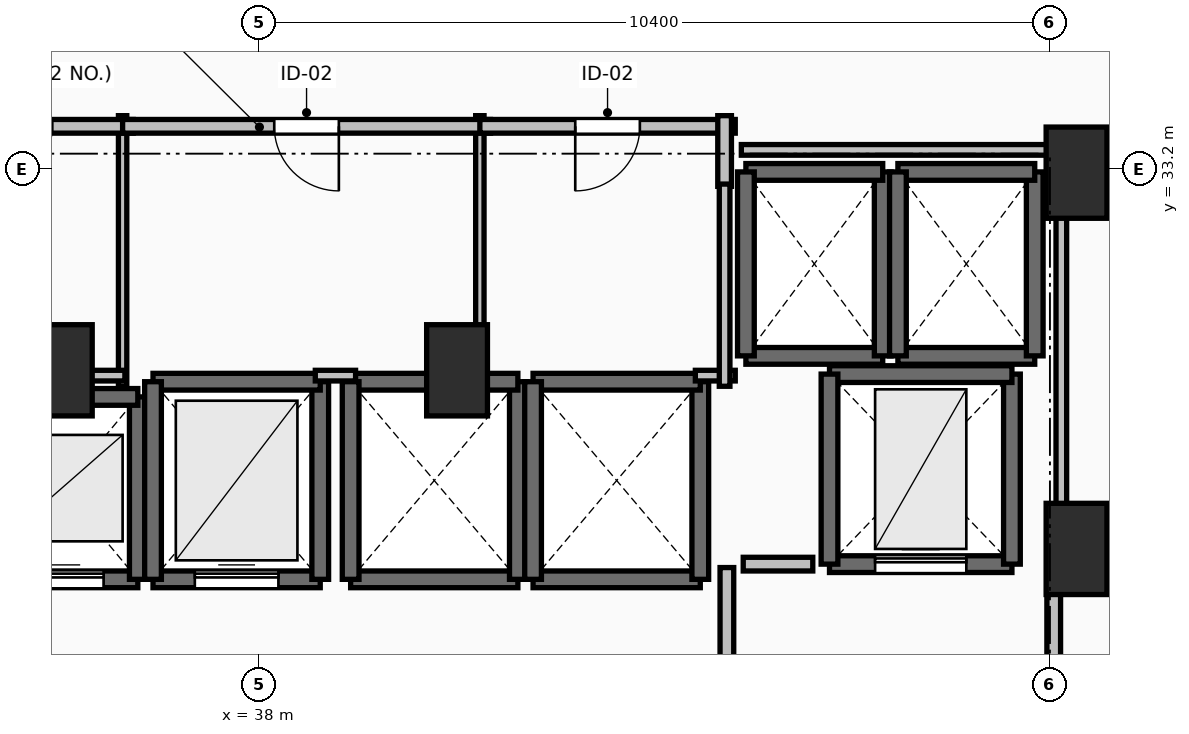
"""IFC4 building model, lengths in metres.
Left out: names, types, materials, properties, quantities, classifications, styles, units other than length and angle.
Written with IfcOpenShell. Run it as: python <this file> out.ifc"""

import sys

from ifc_helpers import new_model, si_unit, direction, frame, frame_2d, origin, origin_2d, place, context, subcontext, project, spatial, rectangle, extrude, element, fill, save


model = new_model("IFC4")
c1 = context("Model", 3, precision=1e-05, world=origin(), true_north=direction((0.0, 1.0)))
c2 = subcontext(c1, "Body", "Model", "MODEL_VIEW")
j1 = project(units=[si_unit("LENGTHUNIT", "METRE"), si_unit("PLANEANGLEUNIT", "RADIAN")], contexts=[c1])
p1 = place(None, origin())
s1 = spatial("IfcSite", under=j1, at=p1, CompositionType="ELEMENT")
p2 = place(p1, origin())
s2 = spatial("IfcBuilding", under=s1, at=p2, CompositionType="ELEMENT")
p3 = place(p2, frame((0.0, 0.0, 59.0)))
s3 = spatial("IfcBuildingStorey", under=s2, at=p3, CompositionType="ELEMENT", Elevation=59.0)
for number, where, z_axis, x_axis in (
    (1, (48.75, 33.15, 0.0), (0.0, 0.0, 1.0), (1.0, 0.0, 0.0)),
    (2, (48.75, 28.2, 0.0), (0.0, 0.0, 1.0), (1.0, 0.0, 0.0)),
    (3, (35.4, 30.55, 0.0), (0.0, 0.0, 1.0), (1.0, 0.0, 0.0)),
    (4, (40.6, 30.55, 0.0), (0.0, 0.0, 1.0), (1.0, 0.0, 0.0)),
):
    element("IfcColumn", number, at=place(p3, frame(where, z_axis=z_axis, x_axis=x_axis)), inside=s3, PredefinedType="PILASTER", context=c2, shape_type="SweptSolid", body=[
        extrude(rectangle(XDim=0.8, YDim=1.2, at=origin_2d()), origin(), (0.0, 0.0, 1.0), 3.5),
    ])
p4 = place(p3, frame((34.4, 27.8, 0.0), z_axis=(0.0, 0.0, 1.0), x_axis=(1.0, 0.0, 0.0)))
e5 = element("IfcWall", 5, at=p4, inside=s3, PredefinedType="SOLIDWALL", context=c2, shape_type="SweptSolid", body=[
    extrude(rectangle(XDim=2.0, YDim=0.22, at=frame_2d((1.0, 0.0))), origin(), (0.0, 0.0, 1.0), 3.24),
])
p5 = place(p4, frame((0.45, 0.0, 0.0)))
e6 = element("IfcOpeningElement", 6, at=p5, cuts=e5, PredefinedType="OPENING", context=c2, shape_type="SweptSolid", body=[
    extrude(rectangle(XDim=1.1, YDim=2.2, at=frame_2d((0.55, 1.1))), frame((0.0, 0.125, 0.0), z_axis=(0.0, -1.0, 0.0), x_axis=(1.0, 0.0, 0.0)), (0.0, 0.0, 1.0), 0.25),
])
p6 = place(p3, frame((36.4, 27.8, 0.0), z_axis=(0.0, 0.0, 1.0), x_axis=(0.0, 1.0, 0.0)))
e7 = element("IfcWall", 7, at=p6, inside=s3, PredefinedType="SOLIDWALL", context=c2, shape_type="SweptSolid", body=[
    extrude(rectangle(XDim=2.4, YDim=0.22, at=frame_2d((1.2, 0.0))), origin(), (0.0, 0.0, 1.0), 3.24),
])
p7 = place(p3, frame((36.4, 30.2, 0.0), z_axis=(0.0, 0.0, 1.0), x_axis=(-1.0, 0.0, 0.0)))
e8 = element("IfcWall", 8, at=p7, inside=s3, PredefinedType="SOLIDWALL", context=c2, shape_type="SweptSolid", body=[
    extrude(rectangle(XDim=2.0, YDim=0.22, at=frame_2d((1.0, 0.0))), origin(), (0.0, 0.0, 1.0), 3.24),
])
p8 = place(p3, frame((36.6, 27.8, 0.0), z_axis=(0.0, 0.0, 1.0), x_axis=(1.0, 0.0, 0.0)))
e9 = element("IfcWall", 9, at=p8, inside=s3, PredefinedType="SOLIDWALL", context=c2, shape_type="SweptSolid", body=[
    extrude(rectangle(XDim=2.2, YDim=0.22, at=frame_2d((1.1, 0.0))), origin(), (0.0, 0.0, 1.0), 3.24),
])
p9 = place(p8, frame((0.55, 0.0, 0.0)))
e10 = element("IfcOpeningElement", 10, at=p9, cuts=e9, PredefinedType="OPENING", context=c2, shape_type="SweptSolid", body=[
    extrude(rectangle(XDim=1.1, YDim=2.2, at=frame_2d((0.55, 1.1))), frame((0.0, 0.125, 0.0), z_axis=(0.0, -1.0, 0.0), x_axis=(1.0, 0.0, 0.0)), (0.0, 0.0, 1.0), 0.25),
])
p10 = place(p3, frame((38.8, 27.8, 0.0), z_axis=(0.0, 0.0, 1.0), x_axis=(0.0, 1.0, 0.0)))
e11 = element("IfcWall", 11, at=p10, inside=s3, PredefinedType="SOLIDWALL", context=c2, shape_type="SweptSolid", body=[
    extrude(rectangle(XDim=2.6, YDim=0.22, at=frame_2d((1.3, 0.0))), origin(), (0.0, 0.0, 1.0), 3.24),
])
p11 = place(p3, frame((38.8, 30.4, 0.0), z_axis=(0.0, 0.0, 1.0), x_axis=(-1.0, 0.0, 0.0)))
e12 = element("IfcWall", 12, at=p11, inside=s3, PredefinedType="SOLIDWALL", context=c2, shape_type="SweptSolid", body=[
    extrude(rectangle(XDim=2.2, YDim=0.22, at=frame_2d((1.1, 0.0))), origin(), (0.0, 0.0, 1.0), 3.24),
])
p12 = place(p3, frame((36.6, 30.4, 0.0), z_axis=(0.0, 0.0, 1.0), x_axis=(0.0, -1.0, 0.0)))
e13 = element("IfcWall", 13, at=p12, inside=s3, PredefinedType="SOLIDWALL", context=c2, shape_type="SweptSolid", body=[
    extrude(rectangle(XDim=2.6, YDim=0.22, at=frame_2d((1.3, 0.0))), origin(), (0.0, 0.0, 1.0), 3.24),
])
p13 = place(p3, frame((39.2, 27.8, 0.0), z_axis=(0.0, 0.0, 1.0), x_axis=(1.0, 0.0, 0.0)))
e14 = element("IfcWall", 14, at=p13, inside=s3, PredefinedType="SOLIDWALL", context=c2, shape_type="SweptSolid", body=[
    extrude(rectangle(XDim=2.2, YDim=0.22, at=frame_2d((1.1, 0.0))), origin(), (0.0, 0.0, 1.0), 3.24),
])
p14 = place(p3, frame((41.4, 27.8, 0.0), z_axis=(0.0, 0.0, 1.0), x_axis=(0.0, 1.0, 0.0)))
e15 = element("IfcWall", 15, at=p14, inside=s3, PredefinedType="SOLIDWALL", context=c2, shape_type="SweptSolid", body=[
    extrude(rectangle(XDim=2.6, YDim=0.22, at=frame_2d((1.3, 0.0))), origin(), (0.0, 0.0, 1.0), 3.24),
])
p15 = place(p3, frame((41.4, 30.4, 0.0), z_axis=(0.0, 0.0, 1.0), x_axis=(-1.0, 0.0, 0.0)))
e16 = element("IfcWall", 16, at=p15, inside=s3, PredefinedType="SOLIDWALL", context=c2, shape_type="SweptSolid", body=[
    extrude(rectangle(XDim=2.2, YDim=0.22, at=frame_2d((1.1, 0.0))), origin(), (0.0, 0.0, 1.0), 3.24),
])
p16 = place(p3, frame((39.2, 30.4, 0.0), z_axis=(0.0, 0.0, 1.0), x_axis=(0.0, -1.0, 0.0)))
e17 = element("IfcWall", 17, at=p16, inside=s3, PredefinedType="SOLIDWALL", context=c2, shape_type="SweptSolid", body=[
    extrude(rectangle(XDim=2.6, YDim=0.22, at=frame_2d((1.3, 0.0))), origin(), (0.0, 0.0, 1.0), 3.24),
])
p17 = place(p3, frame((41.6, 27.8, 0.0), z_axis=(0.0, 0.0, 1.0), x_axis=(1.0, 0.0, 0.0)))
e18 = element("IfcWall", 18, at=p17, inside=s3, PredefinedType="SOLIDWALL", context=c2, shape_type="SweptSolid", body=[
    extrude(rectangle(XDim=2.2, YDim=0.22, at=frame_2d((1.1, 0.0))), origin(), (0.0, 0.0, 1.0), 3.24),
])
p18 = place(p3, frame((43.8, 27.8, 0.0), z_axis=(0.0, 0.0, 1.0), x_axis=(0.0, 1.0, 0.0)))
e19 = element("IfcWall", 19, at=p18, inside=s3, PredefinedType="SOLIDWALL", context=c2, shape_type="SweptSolid", body=[
    extrude(rectangle(XDim=2.6, YDim=0.22, at=frame_2d((1.3, 0.0))), origin(), (0.0, 0.0, 1.0), 3.24),
])
p19 = place(p3, frame((43.8, 30.4, 0.0), z_axis=(0.0, 0.0, 1.0), x_axis=(-1.0, 0.0, 0.0)))
e20 = element("IfcWall", 20, at=p19, inside=s3, PredefinedType="SOLIDWALL", context=c2, shape_type="SweptSolid", body=[
    extrude(rectangle(XDim=2.2, YDim=0.22, at=frame_2d((1.1, 0.0))), origin(), (0.0, 0.0, 1.0), 3.24),
])
p20 = place(p3, frame((41.6, 30.4, 0.0), z_axis=(0.0, 0.0, 1.0), x_axis=(0.0, -1.0, 0.0)))
e21 = element("IfcWall", 21, at=p20, inside=s3, PredefinedType="SOLIDWALL", context=c2, shape_type="SweptSolid", body=[
    extrude(rectangle(XDim=2.6, YDim=0.22, at=frame_2d((1.3, 0.0))), origin(), (0.0, 0.0, 1.0), 3.24),
])
p21 = place(p3, frame((44.4, 30.74, 0.0), z_axis=(0.0, 0.0, 1.0), x_axis=(1.0, 0.0, 0.0)))
e22 = element("IfcWall", 22, at=p21, inside=s3, PredefinedType="SOLIDWALL", context=c2, shape_type="SweptSolid", body=[
    extrude(rectangle(XDim=1.8, YDim=0.22, at=frame_2d((0.9, 0.0))), origin(), (0.0, 0.0, 1.0), 3.24),
])
p22 = place(p3, frame((46.2, 30.74, 0.0), z_axis=(0.0, 0.0, 1.0), x_axis=(0.0, 1.0, 0.0)))
e23 = element("IfcWall", 23, at=p22, inside=s3, PredefinedType="SOLIDWALL", context=c2, shape_type="SweptSolid", body=[
    extrude(rectangle(XDim=2.42, YDim=0.22, at=frame_2d((1.21, 0.0))), origin(), (0.0, 0.0, 1.0), 3.24),
])
p23 = place(p3, frame((46.2, 33.16, 0.0), z_axis=(0.0, 0.0, 1.0), x_axis=(-1.0, 0.0, 0.0)))
e24 = element("IfcWall", 24, at=p23, inside=s3, PredefinedType="SOLIDWALL", context=c2, shape_type="SweptSolid", body=[
    extrude(rectangle(XDim=1.8, YDim=0.22, at=frame_2d((0.9, 0.0))), origin(), (0.0, 0.0, 1.0), 3.24),
])
p24 = place(p3, frame((44.4, 33.16, 0.0), z_axis=(0.0, 0.0, 1.0), x_axis=(0.0, -1.0, 0.0)))
e25 = element("IfcWall", 25, at=p24, inside=s3, PredefinedType="SOLIDWALL", context=c2, shape_type="SweptSolid", body=[
    extrude(rectangle(XDim=2.42, YDim=0.22, at=frame_2d((1.21, 0.0))), origin(), (0.0, 0.0, 1.0), 3.24),
])
p25 = place(p3, frame((46.4, 30.74, 0.0), z_axis=(0.0, 0.0, 1.0), x_axis=(1.0, 0.0, 0.0)))
e26 = element("IfcWall", 26, at=p25, inside=s3, PredefinedType="SOLIDWALL", context=c2, shape_type="SweptSolid", body=[
    extrude(rectangle(XDim=1.8, YDim=0.22, at=frame_2d((0.9, 0.0))), origin(), (0.0, 0.0, 1.0), 3.24),
])
p26 = place(p3, frame((48.2, 30.74, 0.0), z_axis=(0.0, 0.0, 1.0), x_axis=(0.0, 1.0, 0.0)))
e27 = element("IfcWall", 27, at=p26, inside=s3, PredefinedType="SOLIDWALL", context=c2, shape_type="SweptSolid", body=[
    extrude(rectangle(XDim=2.42, YDim=0.22, at=frame_2d((1.21, 0.0))), origin(), (0.0, 0.0, 1.0), 3.24),
])
p27 = place(p3, frame((48.2, 33.16, 0.0), z_axis=(0.0, 0.0, 1.0), x_axis=(-1.0, 0.0, 0.0)))
e28 = element("IfcWall", 28, at=p27, inside=s3, PredefinedType="SOLIDWALL", context=c2, shape_type="SweptSolid", body=[
    extrude(rectangle(XDim=1.8, YDim=0.22, at=frame_2d((0.9, 0.0))), origin(), (0.0, 0.0, 1.0), 3.24),
])
p28 = place(p3, frame((46.4, 33.16, 0.0), z_axis=(0.0, 0.0, 1.0), x_axis=(0.0, -1.0, 0.0)))
e29 = element("IfcWall", 29, at=p28, inside=s3, PredefinedType="SOLIDWALL", context=c2, shape_type="SweptSolid", body=[
    extrude(rectangle(XDim=2.42, YDim=0.22, at=frame_2d((1.21, 0.0))), origin(), (0.0, 0.0, 1.0), 3.24),
])
p29 = place(p3, frame((45.5, 28.0, 0.0), z_axis=(0.0, 0.0, 1.0), x_axis=(1.0, 0.0, 0.0)))
e30 = element("IfcWall", 30, at=p29, inside=s3, PredefinedType="SHEAR", context=c2, shape_type="SweptSolid", body=[
    extrude(rectangle(XDim=2.4, YDim=0.22, at=frame_2d((1.2, 0.0))), origin(), (0.0, 0.0, 1.0), 3.24),
])
p30 = place(p29, frame((0.6, 0.0, 0.0)))
e31 = element("IfcOpeningElement", 31, at=p30, cuts=e30, PredefinedType="OPENING", context=c2, shape_type="SweptSolid", body=[
    extrude(rectangle(XDim=1.2, YDim=2.2, at=frame_2d((0.6, 1.1))), frame((0.0, 0.125, 0.0), z_axis=(0.0, -1.0, 0.0), x_axis=(1.0, 0.0, 0.0)), (0.0, 0.0, 1.0), 0.25),
])
p31 = place(p3, frame((47.9, 28.0, 0.0), z_axis=(0.0, 0.0, 1.0), x_axis=(0.0, 1.0, 0.0)))
e32 = element("IfcWall", 32, at=p31, inside=s3, PredefinedType="SHEAR", context=c2, shape_type="SweptSolid", body=[
    extrude(rectangle(XDim=2.5, YDim=0.22, at=frame_2d((1.25, 0.0))), origin(), (0.0, 0.0, 1.0), 3.24),
])
p32 = place(p3, frame((47.9, 30.5, 0.0), z_axis=(0.0, 0.0, 1.0), x_axis=(-1.0, 0.0, 0.0)))
e33 = element("IfcWall", 33, at=p32, inside=s3, PredefinedType="SHEAR", context=c2, shape_type="SweptSolid", body=[
    extrude(rectangle(XDim=2.4, YDim=0.22, at=frame_2d((1.2, 0.0))), origin(), (0.0, 0.0, 1.0), 3.24),
])
p33 = place(p3, frame((45.5, 30.5, 0.0), z_axis=(0.0, 0.0, 1.0), x_axis=(0.0, -1.0, 0.0)))
e34 = element("IfcWall", 34, at=p33, inside=s3, PredefinedType="SHEAR", context=c2, shape_type="SweptSolid", body=[
    extrude(rectangle(XDim=2.5, YDim=0.22, at=frame_2d((1.25, 0.0))), origin(), (0.0, 0.0, 1.0), 3.24),
])
p34 = place(p3, frame((44.15, 27.955, 0.0), z_axis=(0.0, 0.0, 1.0), x_axis=(0.0, -1.0, 0.0)))
e35 = element("IfcWall", 35, at=p34, inside=s3, PredefinedType="PARTITIONING", context=c2, shape_type="SweptSolid", body=[
    extrude(rectangle(XDim=3.91, YDim=0.18, at=frame_2d((1.955, 0.0))), origin(), (0.0, 0.0, 1.0), 3.24),
])
p35 = place(p34, frame((1.355, 0.0, 0.0)))
e36 = element("IfcOpeningElement", 36, at=p35, cuts=e35, PredefinedType="OPENING", context=c2, shape_type="SweptSolid", body=[
    extrude(rectangle(XDim=1.2, YDim=2.15, at=frame_2d((0.6, 1.075))), frame((0.0, 0.105, 0.0), z_axis=(0.0, -1.0, 0.0), x_axis=(1.0, 0.0, 0.0)), (0.0, 0.0, 1.0), 0.21),
])
p36 = place(p3, frame((48.45, 23.95, 0.0), z_axis=(0.0, 0.0, 1.0), x_axis=(0.0, 1.0, 0.0)))
e37 = element("IfcWall", 37, at=p36, inside=s3, PredefinedType="PARTITIONING", context=c2, shape_type="SweptSolid", body=[
    extrude(rectangle(XDim=4.05, YDim=0.18, at=frame_2d((2.025, 0.0))), origin(), (0.0, 0.0, 1.0), 3.24),
])
p37 = place(p36, frame((1.425, 0.0, 0.0)))
e38 = element("IfcOpeningElement", 38, at=p37, cuts=e37, PredefinedType="OPENING", context=c2, shape_type="SweptSolid", body=[
    extrude(rectangle(XDim=1.2, YDim=2.15, at=frame_2d((0.6, 1.075))), frame((0.0, 0.105, 0.0), z_axis=(0.0, -1.0, 0.0), x_axis=(1.0, 0.0, 0.0)), (0.0, 0.0, 1.0), 0.21),
])
p38 = place(p3, frame((36.2, 30.34, 0.0), z_axis=(0.0, 0.0, 1.0), x_axis=(0.0, 1.0, 0.0)))
e39 = element("IfcWall", 39, at=p38, inside=s3, PredefinedType="PARTITIONING", context=c2, shape_type="SweptSolid", body=[
    extrude(rectangle(XDim=3.56, YDim=0.11, at=frame_2d((1.78, 0.0))), origin(), (0.0, 0.0, 1.0), 2.432),
])
p39 = place(p3, frame((36.34, 33.76, 0.0), z_axis=(0.0, 0.0, 1.0), x_axis=(-1.0, 0.0, 0.0)))
e40 = element("IfcWall", 40, at=p39, inside=s3, PredefinedType="PARTITIONING", context=c2, shape_type="SweptSolid", body=[
    extrude(rectangle(XDim=2.98, YDim=0.18, at=frame_2d((1.49, 0.0))), origin(), (0.0, 0.0, 1.0), 3.24),
])
p40 = place(p39, frame((1.065, 0.0, 0.0)))
e41 = element("IfcOpeningElement", 41, at=p40, cuts=e40, PredefinedType="OPENING", context=c2, shape_type="SweptSolid", body=[
    extrude(rectangle(XDim=0.85, YDim=2.1, at=frame_2d((0.425, 1.05))), frame((0.0, 0.105, 0.0), z_axis=(0.0, -1.0, 0.0), x_axis=(1.0, 0.0, 0.0)), (0.0, 0.0, 1.0), 0.21),
])
p41 = place(p3, frame((40.9, 30.34, 0.0), z_axis=(0.0, 0.0, 1.0), x_axis=(0.0, 1.0, 0.0)))
e42 = element("IfcWall", 42, at=p41, inside=s3, PredefinedType="PARTITIONING", context=c2, shape_type="SweptSolid", body=[
    extrude(rectangle(XDim=3.56, YDim=0.11, at=frame_2d((1.78, 0.0))), origin(), (0.0, 0.0, 1.0), 3.24),
])
p42 = place(p3, frame((41.04, 33.76, 0.0), z_axis=(0.0, 0.0, 1.0), x_axis=(-1.0, 0.0, 0.0)))
e43 = element("IfcWall", 43, at=p42, inside=s3, PredefinedType="PARTITIONING", context=c2, shape_type="SweptSolid", body=[
    extrude(rectangle(XDim=4.84, YDim=0.18, at=frame_2d((2.42, 0.0))), origin(), (0.0, 0.0, 1.0), 3.24),
])
p43 = place(p42, frame((1.995, 0.0, 0.0)))
e44 = element("IfcOpeningElement", 44, at=p43, cuts=e43, PredefinedType="OPENING", context=c2, shape_type="SweptSolid", body=[
    extrude(rectangle(XDim=0.85, YDim=2.1, at=frame_2d((0.425, 1.05))), frame((0.0, 0.105, 0.0), z_axis=(0.0, -1.0, 0.0), x_axis=(1.0, 0.0, 0.0)), (0.0, 0.0, 1.0), 0.21),
])
p44 = place(p3, frame((44.26, 33.76, 0.0), z_axis=(0.0, 0.0, 1.0), x_axis=(-1.0, 0.0, 0.0)))
e45 = element("IfcWall", 45, at=p44, inside=s3, PredefinedType="PARTITIONING", context=c2, shape_type="SweptSolid", body=[
    extrude(rectangle(XDim=3.36, YDim=0.18, at=frame_2d((1.68, 0.0))), origin(), (0.0, 0.0, 1.0), 3.24),
])
p45 = place(p44, frame((1.255, 0.0, 0.0)))
e46 = element("IfcOpeningElement", 46, at=p45, cuts=e45, PredefinedType="OPENING", context=c2, shape_type="SweptSolid", body=[
    extrude(rectangle(XDim=0.85, YDim=2.1, at=frame_2d((0.425, 1.05))), frame((0.0, 0.105, 0.0), z_axis=(0.0, -1.0, 0.0), x_axis=(1.0, 0.0, 0.0)), (0.0, 0.0, 1.0), 0.21),
])
p46 = place(p3, frame((44.12, 32.97, 0.0), z_axis=(0.0, 0.0, 1.0), x_axis=(0.0, 1.0, 0.0)))
e47 = element("IfcWall", 47, at=p46, inside=s3, PredefinedType="PARTITIONING", context=c2, shape_type="SweptSolid", body=[
    extrude(rectangle(XDim=0.93, YDim=0.18, at=frame_2d((0.465, 0.0))), origin(), (0.0, 0.0, 1.0), 3.24),
])
p47 = place(p3, frame((45.28, 28.0, 0.0), z_axis=(0.0, 0.0, 1.0), x_axis=(-1.0, 0.0, 0.0)))
e48 = element("IfcWall", 48, at=p47, inside=s3, PredefinedType="PARTITIONING", context=c2, shape_type="SweptSolid", body=[
    extrude(rectangle(XDim=0.915, YDim=0.18, at=frame_2d((0.458, 0.0))), origin(), (0.0, 0.0, 1.0), 3.24),
])
p48 = place(p3, frame((33.44, 30.48, 0.0), z_axis=(0.0, 0.0, 1.0), x_axis=(1.0, 0.0, 0.0)))
e49 = element("IfcWall", 49, at=p48, inside=s3, PredefinedType="PARTITIONING", context=c2, shape_type="SweptSolid", body=[
    extrude(rectangle(XDim=2.79, YDim=0.14, at=frame_2d((1.395, 0.0))), origin(), (0.0, 0.0, 1.0), 2.432),
])
p49 = place(p3, frame((38.735, 30.48, 0.0), z_axis=(0.0, 0.0, 1.0), x_axis=(1.0, 0.0, 0.0)))
e50 = element("IfcWall", 50, at=p49, inside=s3, PredefinedType="PARTITIONING", context=c2, shape_type="SweptSolid", body=[
    extrude(rectangle(XDim=0.53, YDim=0.14, at=frame_2d((0.265, 0.0))), origin(), (0.0, 0.0, 1.0), 2.432),
])
p50 = place(p3, frame((43.735, 30.48, 0.0), z_axis=(0.0, 0.0, 1.0), x_axis=(1.0, 0.0, 0.0)))
e51 = element("IfcWall", 51, at=p50, inside=s3, PredefinedType="PARTITIONING", context=c2, shape_type="SweptSolid", body=[
    extrude(rectangle(XDim=0.525, YDim=0.14, at=frame_2d((0.262, 0.0))), origin(), (0.0, 0.0, 1.0), 3.24),
])
p51 = place(p3, frame((44.12, 30.34, 0.0), z_axis=(0.0, 0.0, 1.0), x_axis=(0.0, 1.0, 0.0)))
e52 = element("IfcWall", 52, at=p51, inside=s3, PredefinedType="PARTITIONING", context=c2, shape_type="SweptSolid", body=[
    extrude(rectangle(XDim=2.66, YDim=0.14, at=frame_2d((1.33, 0.0))), origin(), (0.0, 0.0, 1.0), 3.24),
])
p52 = place(p3, frame((44.34, 33.45, 0.0), z_axis=(0.0, 0.0, 1.0), x_axis=(1.0, 0.0, 0.0)))
e53 = element("IfcWall", 53, at=p52, inside=s3, PredefinedType="PARTITIONING", context=c2, shape_type="SweptSolid", body=[
    extrude(rectangle(XDim=4.21, YDim=0.14, at=frame_2d((2.105, 0.0))), origin(), (0.0, 0.0, 1.0), 2.432),
])
p53 = place(p3, frame((48.55, 33.45, 0.0), z_axis=(0.0, 0.0, 1.0), x_axis=(0.0, -1.0, 0.0)))
e54 = element("IfcWall", 54, at=p53, inside=s3, PredefinedType="PARTITIONING", context=c2, shape_type="SweptSolid", body=[
    extrude(rectangle(XDim=5.254, YDim=0.14, at=frame_2d((2.627, 0.0))), origin(), (0.0, 0.0, 1.0), 2.432),
])
p54 = place(p5, origin())
e55 = element("IfcDoor", 55, at=p54, inside=s3, OperationType="SLIDING_TO_LEFT", PredefinedType="DOOR", context=c2, shape_type="SweptSolid", body=[
    extrude(rectangle(XDim=1.1, YDim=2.2, at=frame_2d((0.55, 1.1))), frame((0.0, 0.025, 0.0), z_axis=(0.0, -1.0, 0.0), x_axis=(1.0, 0.0, 0.0)), (0.0, 0.0, 1.0), 0.05),
])
fill(e6, e55)
p55 = place(p9, origin())
e56 = element("IfcDoor", 56, at=p55, inside=s3, OperationType="SLIDING_TO_LEFT", PredefinedType="DOOR", context=c2, shape_type="SweptSolid", body=[
    extrude(rectangle(XDim=1.1, YDim=2.2, at=frame_2d((0.55, 1.1))), frame((0.0, 0.025, 0.0), z_axis=(0.0, -1.0, 0.0), x_axis=(1.0, 0.0, 0.0)), (0.0, 0.0, 1.0), 0.05),
])
fill(e10, e56)
p56 = place(p30, origin())
e57 = element("IfcDoor", 57, at=p56, inside=s3, OperationType="SLIDING_TO_LEFT", PredefinedType="DOOR", context=c2, shape_type="SweptSolid", body=[
    extrude(rectangle(XDim=1.2, YDim=2.2, at=frame_2d((0.6, 1.1))), frame((0.0, 0.025, 0.0), z_axis=(0.0, -1.0, 0.0), x_axis=(1.0, 0.0, 0.0)), (0.0, 0.0, 1.0), 0.05),
])
fill(e31, e57)
p57 = place(p40, origin())
e58 = element("IfcDoor", 58, at=p57, inside=s3, OperationType="SINGLE_SWING_RIGHT", PredefinedType="DOOR", context=c2, shape_type="SweptSolid", body=[
    extrude(rectangle(XDim=0.85, YDim=2.1, at=frame_2d((0.425, 1.05))), frame((0.0, 0.025, 0.0), z_axis=(0.0, -1.0, 0.0), x_axis=(1.0, 0.0, 0.0)), (0.0, 0.0, 1.0), 0.05),
])
fill(e41, e58)
p58 = place(p43, origin())
e59 = element("IfcDoor", 59, at=p58, inside=s3, OperationType="SINGLE_SWING_LEFT", PredefinedType="DOOR", context=c2, shape_type="SweptSolid", body=[
    extrude(rectangle(XDim=0.85, YDim=2.1, at=frame_2d((0.425, 1.05))), frame((0.0, 0.025, 0.0), z_axis=(0.0, -1.0, 0.0), x_axis=(1.0, 0.0, 0.0)), (0.0, 0.0, 1.0), 0.05),
])
fill(e44, e59)
p59 = place(p45, origin())
e60 = element("IfcDoor", 60, at=p59, inside=s3, OperationType="SINGLE_SWING_RIGHT", PredefinedType="DOOR", context=c2, shape_type="SweptSolid", body=[
    extrude(rectangle(XDim=0.85, YDim=2.1, at=frame_2d((0.425, 1.05))), frame((0.0, 0.025, 0.0), z_axis=(0.0, -1.0, 0.0), x_axis=(1.0, 0.0, 0.0)), (0.0, 0.0, 1.0), 0.05),
])
fill(e46, e60)
save(model, sys.argv[1])
